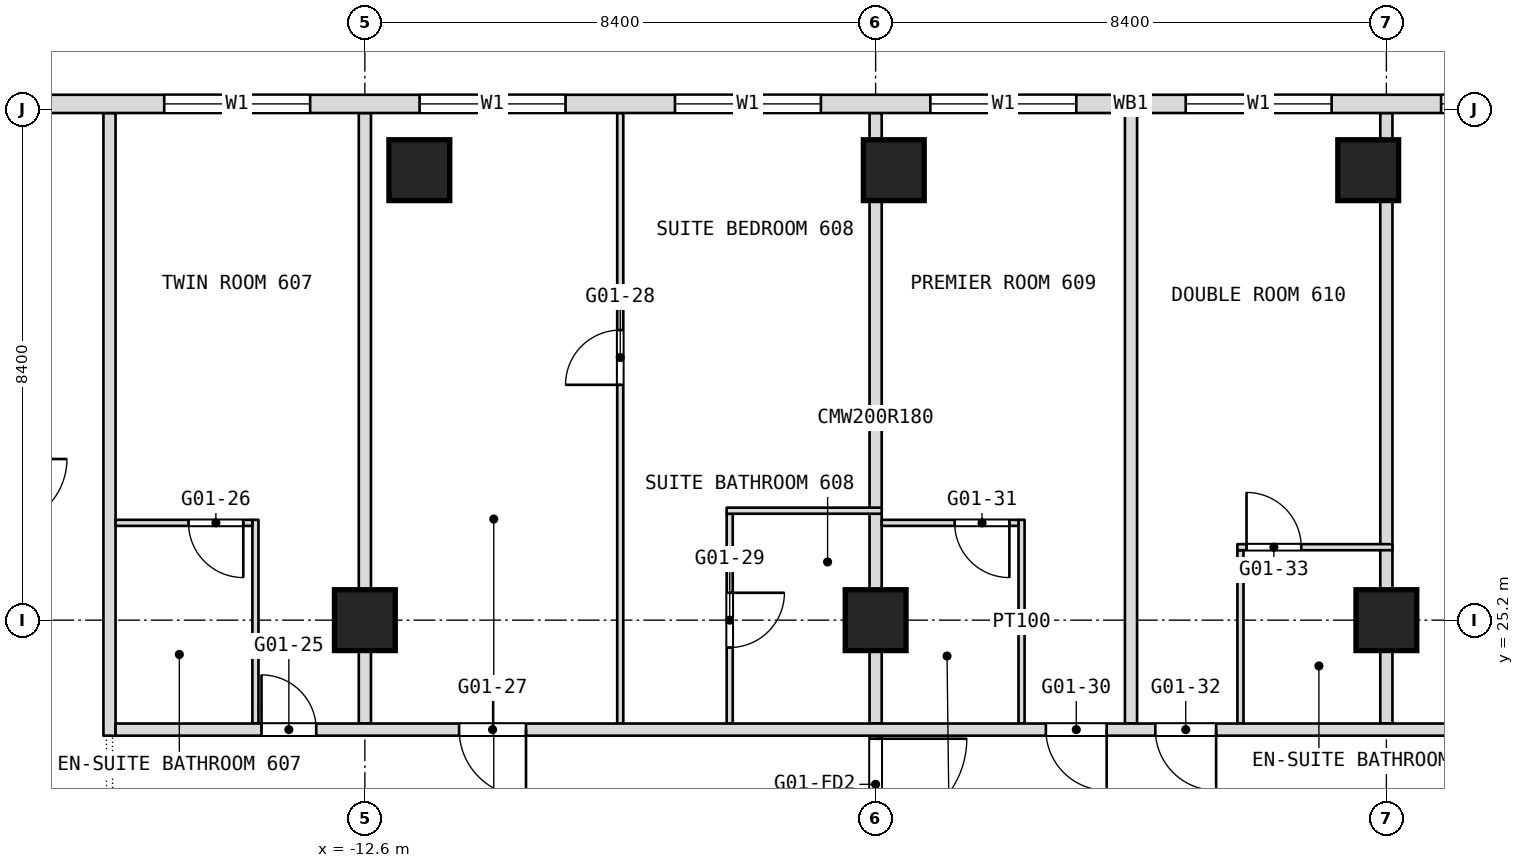
"""IFC4 building model, lengths in metres.
Left out: names, types, materials, properties, quantities, classifications, styles, units other than length and angle.
Written with IfcOpenShell. Run it as: python <this file> out.ifc"""

import sys

from ifc_helpers import new_model, si_unit, direction, frame, frame_2d, origin, origin_2d, place, context, subcontext, project, spatial, rectangle, extrude, element, fill, save


model = new_model("IFC4")
c1 = context("Model", 3, precision=1e-05, world=origin(), true_north=direction((0.0, 1.0)))
c2 = subcontext(c1, "Body", "Model", "MODEL_VIEW")
j1 = project(units=[si_unit("LENGTHUNIT", "METRE"), si_unit("PLANEANGLEUNIT", "RADIAN")], contexts=[c1])
p1 = place(None, origin())
s1 = spatial("IfcSite", under=j1, at=p1, CompositionType="ELEMENT")
p2 = place(p1, origin())
s2 = spatial("IfcBuilding", under=s1, at=p2, CompositionType="ELEMENT")
p3 = place(p2, frame((0.0, 0.0, 36.5)))
s3 = spatial("IfcBuildingStorey", under=s2, at=p3, CompositionType="ELEMENT", Elevation=36.5)
for number, where, z_axis, x_axis in (
    (1, (-12.6, 25.2, 0.0), (0.0, 0.0, 1.0), (1.0, 0.0, 0.0)),
    (2, (-4.2, 25.2, 0.0), (0.0, 0.0, 1.0), (1.0, 0.0, 0.0)),
    (3, (4.2, 25.2, 0.0), (0.0, 0.0, 1.0), (1.0, 0.0, 0.0)),
    (4, (-11.704, 32.6, 0.0), (0.0, 0.0, 1.0), (1.0, 0.0, 0.0)),
    (5, (-3.901, 32.6, 0.0), (0.0, 0.0, 1.0), (1.0, 0.0, 0.0)),
    (6, (3.901, 32.6, 0.0), (0.0, 0.0, 1.0), (1.0, 0.0, 0.0)),
):
    element("IfcColumn", number, at=place(p3, frame(where, z_axis=z_axis, x_axis=x_axis)), inside=s3, PredefinedType="COLUMN", context=c2, shape_type="SweptSolid", body=[
        extrude(rectangle(XDim=1.0, YDim=1.0, at=origin_2d()), origin(), (0.0, 0.0, 1.0), 3.6),
    ])
p4 = place(p3, frame((4.2, 23.5, 0.0), z_axis=(0.0, 0.0, 1.0), x_axis=(0.0, 1.0, 0.0)))
e7 = element("IfcWall", 7, at=p4, inside=s3, PredefinedType="PARTITIONING", context=c2, shape_type="SweptSolid", body=[
    extrude(rectangle(XDim=10.04, YDim=0.2, at=frame_2d((5.02, 0.0))), origin(), (0.0, 0.0, 1.0), 3.34),
])
p5 = place(p3, frame((1.8, 23.5, 0.0), z_axis=(0.0, 0.0, 1.0), x_axis=(0.0, 1.0, 0.0)))
e8 = element("IfcWall", 8, at=p5, inside=s3, PredefinedType="PARTITIONING", context=c2, shape_type="SweptSolid", body=[
    extrude(rectangle(XDim=2.85, YDim=0.1, at=frame_2d((1.425, 0.0))), origin(), (0.0, 0.0, 1.0), 3.34),
])
p6 = place(p3, frame((0.0, 23.5, 0.0), z_axis=(0.0, 0.0, 1.0), x_axis=(0.0, 1.0, 0.0)))
e9 = element("IfcWall", 9, at=p6, inside=s3, PredefinedType="PARTITIONING", context=c2, shape_type="SweptSolid", body=[
    extrude(rectangle(XDim=10.04, YDim=0.2, at=frame_2d((5.02, 0.0))), origin(), (0.0, 0.0, 1.0), 3.34),
])
p7 = place(p3, frame((-1.8, 23.5, 0.0), z_axis=(0.0, 0.0, 1.0), x_axis=(0.0, 1.0, 0.0)))
e10 = element("IfcWall", 10, at=p7, inside=s3, PredefinedType="PARTITIONING", context=c2, shape_type="SweptSolid", body=[
    extrude(rectangle(XDim=3.35, YDim=0.1, at=frame_2d((1.675, 0.0))), origin(), (0.0, 0.0, 1.0), 3.34),
])
p8 = place(p3, frame((-4.2, 16.8, 0.0), z_axis=(0.0, 0.0, 1.0), x_axis=(0.0, 1.0, 0.0)))
e11 = element("IfcWall", 11, at=p8, inside=s3, PredefinedType="PARTITIONING", context=c2, shape_type="SweptSolid", body=[
    extrude(rectangle(XDim=6.7, YDim=0.2, at=frame_2d((3.35, 0.0))), origin(), (0.0, 0.0, 1.0), 3.34),
])
p9 = place(p8, frame((0.15, 0.0, 0.0)))
e12 = element("IfcOpeningElement", 12, at=p9, cuts=e11, PredefinedType="OPENING", context=c2, shape_type="SweptSolid", body=[
    extrude(rectangle(XDim=1.5, YDim=2.1, at=frame_2d((0.75, 1.05))), frame((0.0, 0.1, 0.0), z_axis=(0.0, -1.0, 0.0), x_axis=(1.0, 0.0, 0.0)), (0.0, 0.0, 1.0), 0.2),
])
p10 = place(p8, frame((4.95, 0.0, 0.0)))
e13 = element("IfcOpeningElement", 13, at=p10, cuts=e11, PredefinedType="OPENING", context=c2, shape_type="SweptSolid", body=[
    extrude(rectangle(XDim=1.5, YDim=2.1, at=frame_2d((0.75, 1.05))), frame((0.0, 0.1, 0.0), z_axis=(0.0, -1.0, 0.0), x_axis=(1.0, 0.0, 0.0)), (0.0, 0.0, 1.0), 0.2),
])
p11 = place(p3, frame((-4.2, 23.5, 0.0), z_axis=(0.0, 0.0, 1.0), x_axis=(0.0, 1.0, 0.0)))
e14 = element("IfcWall", 14, at=p11, inside=s3, PredefinedType="PARTITIONING", context=c2, shape_type="SweptSolid", body=[
    extrude(rectangle(XDim=10.04, YDim=0.2, at=frame_2d((5.02, 0.0))), origin(), (0.0, 0.0, 1.0), 3.34),
])
p12 = place(p3, frame((-6.6, 23.5, 0.0), z_axis=(0.0, 0.0, 1.0), x_axis=(0.0, 1.0, 0.0)))
e15 = element("IfcWall", 15, at=p12, inside=s3, PredefinedType="PARTITIONING", context=c2, shape_type="SweptSolid", body=[
    extrude(rectangle(XDim=3.45, YDim=0.1, at=frame_2d((1.725, 0.0))), origin(), (0.0, 0.0, 1.0), 3.34),
])
p13 = place(p12, frame((1.25, 0.0, 0.0)))
e16 = element("IfcOpeningElement", 16, at=p13, cuts=e15, PredefinedType="OPENING", context=c2, shape_type="SweptSolid", body=[
    extrude(rectangle(XDim=0.9, YDim=2.1, at=frame_2d((0.45, 1.05))), frame((0.0, 0.05, 0.0), z_axis=(0.0, -1.0, 0.0), x_axis=(1.0, 0.0, 0.0)), (0.0, 0.0, 1.0), 0.1),
])
p14 = place(p3, frame((-8.4, 23.5, 0.0), z_axis=(0.0, 0.0, 1.0), x_axis=(0.0, 1.0, 0.0)))
e17 = element("IfcWall", 17, at=p14, inside=s3, PredefinedType="PARTITIONING", context=c2, shape_type="SweptSolid", body=[
    extrude(rectangle(XDim=10.04, YDim=0.1, at=frame_2d((5.02, 0.0))), origin(), (0.0, 0.0, 1.0), 3.34),
])
p15 = place(p14, frame((5.57, 0.0, 0.0)))
e18 = element("IfcOpeningElement", 18, at=p15, cuts=e17, PredefinedType="OPENING", context=c2, shape_type="SweptSolid", body=[
    extrude(rectangle(XDim=0.9, YDim=2.1, at=frame_2d((0.45, 1.05))), frame((0.0, 0.05, 0.0), z_axis=(0.0, -1.0, 0.0), x_axis=(1.0, 0.0, 0.0)), (0.0, 0.0, 1.0), 0.1),
])
p16 = place(p3, frame((-12.6, 23.5, 0.0), z_axis=(0.0, 0.0, 1.0), x_axis=(0.0, 1.0, 0.0)))
e19 = element("IfcWall", 19, at=p16, inside=s3, PredefinedType="PARTITIONING", context=c2, shape_type="SweptSolid", body=[
    extrude(rectangle(XDim=10.04, YDim=0.2, at=frame_2d((5.02, 0.0))), origin(), (0.0, 0.0, 1.0), 3.34),
])
p17 = place(p3, frame((-14.4, 23.5, 0.0), z_axis=(0.0, 0.0, 1.0), x_axis=(0.0, 1.0, 0.0)))
e20 = element("IfcWall", 20, at=p17, inside=s3, PredefinedType="PARTITIONING", context=c2, shape_type="SweptSolid", body=[
    extrude(rectangle(XDim=3.35, YDim=0.1, at=frame_2d((1.675, 0.0))), origin(), (0.0, 0.0, 1.0), 3.34),
])
p18 = place(p3, frame((-16.8, 23.3, 0.0), z_axis=(0.0, 0.0, 1.0), x_axis=(0.0, 1.0, 0.0)))
e21 = element("IfcWall", 21, at=p18, inside=s3, PredefinedType="PARTITIONING", context=c2, shape_type="SweptSolid", body=[
    extrude(rectangle(XDim=10.24, YDim=0.2, at=frame_2d((5.12, 0.0))), origin(), (0.0, 0.0, 1.0), 3.34),
])
p19 = place(p3, frame((-16.7, 23.4, 0.0), z_axis=(0.0, 0.0, 1.0), x_axis=(1.0, 0.0, 0.0)))
e22 = element("IfcWall", 22, at=p19, inside=s3, PredefinedType="PARTITIONING", context=c2, shape_type="SweptSolid", body=[
    extrude(rectangle(XDim=23.4, YDim=0.2, at=frame_2d((11.7, 0.0))), origin(), (0.0, 0.0, 1.0), 3.34),
])
p20 = place(p19, frame((2.4, 0.0, 0.0)))
e23 = element("IfcOpeningElement", 23, at=p20, cuts=e22, PredefinedType="OPENING", context=c2, shape_type="SweptSolid", body=[
    extrude(rectangle(XDim=0.9, YDim=2.1, at=frame_2d((0.45, 1.05))), frame((0.0, 0.1, 0.0), z_axis=(0.0, -1.0, 0.0), x_axis=(1.0, 0.0, 0.0)), (0.0, 0.0, 1.0), 0.2),
])
p21 = place(p19, frame((5.65, 0.0, 0.0)))
e24 = element("IfcOpeningElement", 24, at=p21, cuts=e22, PredefinedType="OPENING", context=c2, shape_type="SweptSolid", body=[
    extrude(rectangle(XDim=1.1, YDim=2.1, at=frame_2d((0.55, 1.05))), frame((0.0, 0.1, 0.0), z_axis=(0.0, -1.0, 0.0), x_axis=(1.0, 0.0, 0.0)), (0.0, 0.0, 1.0), 0.2),
])
p22 = place(p19, frame((15.3, 0.0, 0.0)))
e25 = element("IfcOpeningElement", 25, at=p22, cuts=e22, PredefinedType="OPENING", context=c2, shape_type="SweptSolid", body=[
    extrude(rectangle(XDim=1.0, YDim=2.1, at=frame_2d((0.5, 1.05))), frame((0.0, 0.1, 0.0), z_axis=(0.0, -1.0, 0.0), x_axis=(1.0, 0.0, 0.0)), (0.0, 0.0, 1.0), 0.2),
])
p23 = place(p19, frame((17.1, 0.0, 0.0)))
e26 = element("IfcOpeningElement", 26, at=p23, cuts=e22, PredefinedType="OPENING", context=c2, shape_type="SweptSolid", body=[
    extrude(rectangle(XDim=1.0, YDim=2.1, at=frame_2d((0.5, 1.05))), frame((0.0, 0.1, 0.0), z_axis=(0.0, -1.0, 0.0), x_axis=(1.0, 0.0, 0.0)), (0.0, 0.0, 1.0), 0.2),
])
p24 = place(p3, frame((1.75, 26.4, 0.0), z_axis=(0.0, 0.0, 1.0), x_axis=(1.0, 0.0, 0.0)))
e27 = element("IfcWall", 27, at=p24, inside=s3, PredefinedType="PARTITIONING", context=c2, shape_type="SweptSolid", body=[
    extrude(rectangle(XDim=2.55, YDim=0.1, at=frame_2d((1.275, 0.0))), origin(), (0.0, 0.0, 1.0), 3.34),
])
p25 = place(p24, frame((0.15, 0.0, 0.0)))
e28 = element("IfcOpeningElement", 28, at=p25, cuts=e27, PredefinedType="OPENING", context=c2, shape_type="SweptSolid", body=[
    extrude(rectangle(XDim=0.9, YDim=2.1, at=frame_2d((0.45, 1.05))), frame((0.0, 0.05, 0.0), z_axis=(0.0, -1.0, 0.0), x_axis=(1.0, 0.0, 0.0)), (0.0, 0.0, 1.0), 0.1),
])
p26 = place(p3, frame((-16.7, 26.8, 0.0), z_axis=(0.0, 0.0, 1.0), x_axis=(1.0, 0.0, 0.0)))
e29 = element("IfcWall", 29, at=p26, inside=s3, PredefinedType="PARTITIONING", context=c2, shape_type="SweptSolid", body=[
    extrude(rectangle(XDim=2.25, YDim=0.1, at=frame_2d((1.125, 0.0))), origin(), (0.0, 0.0, 1.0), 3.34),
])
p27 = place(p26, frame((1.2, 0.0, 0.0)))
e30 = element("IfcOpeningElement", 30, at=p27, cuts=e29, PredefinedType="OPENING", context=c2, shape_type="SweptSolid", body=[
    extrude(rectangle(XDim=0.9, YDim=2.1, at=frame_2d((0.45, 1.05))), frame((0.0, 0.05, 0.0), z_axis=(0.0, -1.0, 0.0), x_axis=(1.0, 0.0, 0.0)), (0.0, 0.0, 1.0), 0.1),
])
p28 = place(p3, frame((-4.1, 26.8, 0.0), z_axis=(0.0, 0.0, 1.0), x_axis=(1.0, 0.0, 0.0)))
e31 = element("IfcWall", 31, at=p28, inside=s3, PredefinedType="PARTITIONING", context=c2, shape_type="SweptSolid", body=[
    extrude(rectangle(XDim=2.25, YDim=0.1, at=frame_2d((1.125, 0.0))), origin(), (0.0, 0.0, 1.0), 3.34),
])
p29 = place(p28, frame((1.2, 0.0, 0.0)))
e32 = element("IfcOpeningElement", 32, at=p29, cuts=e31, PredefinedType="OPENING", context=c2, shape_type="SweptSolid", body=[
    extrude(rectangle(XDim=0.9, YDim=2.1, at=frame_2d((0.45, 1.05))), frame((0.0, 0.05, 0.0), z_axis=(0.0, -1.0, 0.0), x_axis=(1.0, 0.0, 0.0)), (0.0, 0.0, 1.0), 0.1),
])
p30 = place(p3, frame((-6.65, 27.0, 0.0), z_axis=(0.0, 0.0, 1.0), x_axis=(1.0, 0.0, 0.0)))
e33 = element("IfcWall", 33, at=p30, inside=s3, PredefinedType="PARTITIONING", context=c2, shape_type="SweptSolid", body=[
    extrude(rectangle(XDim=2.55, YDim=0.1, at=frame_2d((1.275, 0.0))), origin(), (0.0, 0.0, 1.0), 3.34),
])
p31 = place(p3, frame((23.406, 33.69, 0.0), z_axis=(0.0, 0.0, 1.0), x_axis=(-1.0, 0.0, 0.0)))
e34 = element("IfcWall", 34, at=p31, inside=s3, PredefinedType="NOTDEFINED", context=c2, shape_type="SweptSolid", body=[
    extrude(rectangle(XDim=46.812, YDim=0.3, at=frame_2d((23.406, 0.0))), origin(), (0.0, 0.0, 1.0), 3.6),
])
p32 = place(p31, frame((2.186, 0.0, 0.9)))
e35 = element("IfcOpeningElement", 35, at=p32, cuts=e34, PredefinedType="OPENING", context=c2, shape_type="SweptSolid", body=[
    extrude(rectangle(XDim=2.4, YDim=2.1, at=frame_2d((1.2, 1.05))), frame((0.0, 0.15, 0.0), z_axis=(0.0, -1.0, 0.0), x_axis=(1.0, 0.0, 0.0)), (0.0, 0.0, 1.0), 0.3),
])
p33 = place(p31, frame((7.506, 0.0, 0.9)))
e36 = element("IfcOpeningElement", 36, at=p33, cuts=e34, PredefinedType="OPENING", context=c2, shape_type="SweptSolid", body=[
    extrude(rectangle(XDim=2.4, YDim=2.1, at=frame_2d((1.2, 1.05))), frame((0.0, 0.15, 0.0), z_axis=(0.0, -1.0, 0.0), x_axis=(1.0, 0.0, 0.0)), (0.0, 0.0, 1.0), 0.3),
])
p34 = place(p31, frame((11.706, 0.0, 0.9)))
e37 = element("IfcOpeningElement", 37, at=p34, cuts=e34, PredefinedType="OPENING", context=c2, shape_type="SweptSolid", body=[
    extrude(rectangle(XDim=2.4, YDim=2.1, at=frame_2d((1.2, 1.05))), frame((0.0, 0.15, 0.0), z_axis=(0.0, -1.0, 0.0), x_axis=(1.0, 0.0, 0.0)), (0.0, 0.0, 1.0), 0.3),
])
p35 = place(p31, frame((15.906, 0.0, 0.9)))
e38 = element("IfcOpeningElement", 38, at=p35, cuts=e34, PredefinedType="OPENING", context=c2, shape_type="SweptSolid", body=[
    extrude(rectangle(XDim=2.4, YDim=2.1, at=frame_2d((1.2, 1.05))), frame((0.0, 0.15, 0.0), z_axis=(0.0, -1.0, 0.0), x_axis=(1.0, 0.0, 0.0)), (0.0, 0.0, 1.0), 0.3),
])
p36 = place(p31, frame((20.106, 0.0, 0.9)))
e39 = element("IfcOpeningElement", 39, at=p36, cuts=e34, PredefinedType="OPENING", context=c2, shape_type="SweptSolid", body=[
    extrude(rectangle(XDim=2.4, YDim=2.1, at=frame_2d((1.2, 1.05))), frame((0.0, 0.15, 0.0), z_axis=(0.0, -1.0, 0.0), x_axis=(1.0, 0.0, 0.0)), (0.0, 0.0, 1.0), 0.3),
])
p37 = place(p31, frame((24.306, 0.0, 0.9)))
e40 = element("IfcOpeningElement", 40, at=p37, cuts=e34, PredefinedType="OPENING", context=c2, shape_type="SweptSolid", body=[
    extrude(rectangle(XDim=2.4, YDim=2.1, at=frame_2d((1.2, 1.05))), frame((0.0, 0.15, 0.0), z_axis=(0.0, -1.0, 0.0), x_axis=(1.0, 0.0, 0.0)), (0.0, 0.0, 1.0), 0.3),
])
p38 = place(p31, frame((28.506, 0.0, 0.9)))
e41 = element("IfcOpeningElement", 41, at=p38, cuts=e34, PredefinedType="OPENING", context=c2, shape_type="SweptSolid", body=[
    extrude(rectangle(XDim=2.4, YDim=2.1, at=frame_2d((1.2, 1.05))), frame((0.0, 0.15, 0.0), z_axis=(0.0, -1.0, 0.0), x_axis=(1.0, 0.0, 0.0)), (0.0, 0.0, 1.0), 0.3),
])
p39 = place(p31, frame((32.706, 0.0, 0.9)))
e42 = element("IfcOpeningElement", 42, at=p39, cuts=e34, PredefinedType="OPENING", context=c2, shape_type="SweptSolid", body=[
    extrude(rectangle(XDim=2.4, YDim=2.1, at=frame_2d((1.2, 1.05))), frame((0.0, 0.15, 0.0), z_axis=(0.0, -1.0, 0.0), x_axis=(1.0, 0.0, 0.0)), (0.0, 0.0, 1.0), 0.3),
])
p40 = place(p31, frame((36.906, 0.0, 0.9)))
e43 = element("IfcOpeningElement", 43, at=p40, cuts=e34, PredefinedType="OPENING", context=c2, shape_type="SweptSolid", body=[
    extrude(rectangle(XDim=2.4, YDim=2.1, at=frame_2d((1.2, 1.05))), frame((0.0, 0.15, 0.0), z_axis=(0.0, -1.0, 0.0), x_axis=(1.0, 0.0, 0.0)), (0.0, 0.0, 1.0), 0.3),
])
p41 = place(p31, frame((42.226, 0.0, 0.9)))
e44 = element("IfcOpeningElement", 44, at=p41, cuts=e34, PredefinedType="OPENING", context=c2, shape_type="SweptSolid", body=[
    extrude(rectangle(XDim=2.4, YDim=2.1, at=frame_2d((1.2, 1.05))), frame((0.0, 0.15, 0.0), z_axis=(0.0, -1.0, 0.0), x_axis=(1.0, 0.0, 0.0)), (0.0, 0.0, 1.0), 0.3),
])
p42 = place(p13, origin())
e45 = element("IfcDoor", 45, at=p42, inside=s3, OperationType="SINGLE_SWING_RIGHT", PredefinedType="DOOR", context=c2, shape_type="SweptSolid", body=[
    extrude(rectangle(XDim=0.9, YDim=2.1, at=frame_2d((0.45, 1.05))), frame((0.0, 0.025, 0.0), z_axis=(0.0, -1.0, 0.0), x_axis=(1.0, 0.0, 0.0)), (0.0, 0.0, 1.0), 0.05),
])
fill(e16, e45)
p43 = place(p15, origin())
e46 = element("IfcDoor", 46, at=p43, inside=s3, OperationType="SINGLE_SWING_RIGHT", PredefinedType="DOOR", context=c2, shape_type="SweptSolid", body=[
    extrude(rectangle(XDim=0.9, YDim=2.1, at=frame_2d((0.45, 1.05))), frame((0.0, 0.025, 0.0), z_axis=(0.0, -1.0, 0.0), x_axis=(1.0, 0.0, 0.0)), (0.0, 0.0, 1.0), 0.05),
])
fill(e18, e46)
p44 = place(p20, origin())
e47 = element("IfcDoor", 47, at=p44, inside=s3, OperationType="SINGLE_SWING_LEFT", PredefinedType="DOOR", context=c2, shape_type="SweptSolid", body=[
    extrude(rectangle(XDim=0.9, YDim=2.1, at=frame_2d((0.45, 1.05))), frame((0.0, 0.025, 0.0), z_axis=(0.0, -1.0, 0.0), x_axis=(1.0, 0.0, 0.0)), (0.0, 0.0, 1.0), 0.05),
])
fill(e23, e47)
p45 = place(p21, origin())
e48 = element("IfcDoor", 48, at=p45, inside=s3, OperationType="SINGLE_SWING_RIGHT", PredefinedType="DOOR", context=c2, shape_type="SweptSolid", body=[
    extrude(rectangle(XDim=1.1, YDim=2.1, at=frame_2d((0.55, 1.05))), frame((0.0, 0.025, 0.0), z_axis=(0.0, -1.0, 0.0), x_axis=(1.0, 0.0, 0.0)), (0.0, 0.0, 1.0), 0.05),
])
fill(e24, e48)
p46 = place(p22, origin())
e49 = element("IfcDoor", 49, at=p46, inside=s3, OperationType="SINGLE_SWING_LEFT", PredefinedType="DOOR", context=c2, shape_type="SweptSolid", body=[
    extrude(rectangle(XDim=1.0, YDim=2.1, at=frame_2d((0.5, 1.05))), frame((0.0, 0.025, 0.0), z_axis=(0.0, -1.0, 0.0), x_axis=(1.0, 0.0, 0.0)), (0.0, 0.0, 1.0), 0.05),
])
fill(e25, e49)
p47 = place(p23, origin())
e50 = element("IfcDoor", 50, at=p47, inside=s3, OperationType="SINGLE_SWING_LEFT", PredefinedType="DOOR", context=c2, shape_type="SweptSolid", body=[
    extrude(rectangle(XDim=1.0, YDim=2.1, at=frame_2d((0.5, 1.05))), frame((0.0, 0.025, 0.0), z_axis=(0.0, -1.0, 0.0), x_axis=(1.0, 0.0, 0.0)), (0.0, 0.0, 1.0), 0.05),
])
fill(e26, e50)
p48 = place(p25, origin())
e51 = element("IfcDoor", 51, at=p48, inside=s3, OperationType="SINGLE_SWING_RIGHT", PredefinedType="DOOR", context=c2, shape_type="SweptSolid", body=[
    extrude(rectangle(XDim=0.9, YDim=2.1, at=frame_2d((0.45, 1.05))), frame((0.0, 0.025, 0.0), z_axis=(0.0, -1.0, 0.0), x_axis=(1.0, 0.0, 0.0)), (0.0, 0.0, 1.0), 0.05),
])
fill(e28, e51)
p49 = place(p27, origin())
e52 = element("IfcDoor", 52, at=p49, inside=s3, OperationType="SINGLE_SWING_LEFT", PredefinedType="DOOR", context=c2, shape_type="SweptSolid", body=[
    extrude(rectangle(XDim=0.9, YDim=2.1, at=frame_2d((0.45, 1.05))), frame((0.0, 0.025, 0.0), z_axis=(0.0, -1.0, 0.0), x_axis=(1.0, 0.0, 0.0)), (0.0, 0.0, 1.0), 0.05),
])
fill(e30, e52)
p50 = place(p29, origin())
e53 = element("IfcDoor", 53, at=p50, inside=s3, OperationType="SINGLE_SWING_LEFT", PredefinedType="DOOR", context=c2, shape_type="SweptSolid", body=[
    extrude(rectangle(XDim=0.9, YDim=2.1, at=frame_2d((0.45, 1.05))), frame((0.0, 0.025, 0.0), z_axis=(0.0, -1.0, 0.0), x_axis=(1.0, 0.0, 0.0)), (0.0, 0.0, 1.0), 0.05),
])
fill(e32, e53)
p51 = place(p35, origin())
e54 = element("IfcWindow", 54, at=p51, inside=s3, PartitioningType="SINGLE_PANEL", PredefinedType="WINDOW", context=c2, shape_type="SweptSolid", body=[
    extrude(rectangle(XDim=2.4, YDim=2.1, at=frame_2d((1.2, 1.05))), frame((0.0, 0.03, 0.0), z_axis=(0.0, -1.0, 0.0), x_axis=(1.0, 0.0, 0.0)), (0.0, 0.0, 1.0), 0.06),
])
fill(e38, e54)
p52 = place(p36, origin())
e55 = element("IfcWindow", 55, at=p52, inside=s3, PartitioningType="SINGLE_PANEL", PredefinedType="WINDOW", context=c2, shape_type="SweptSolid", body=[
    extrude(rectangle(XDim=2.4, YDim=2.1, at=frame_2d((1.2, 1.05))), frame((0.0, 0.03, 0.0), z_axis=(0.0, -1.0, 0.0), x_axis=(1.0, 0.0, 0.0)), (0.0, 0.0, 1.0), 0.06),
])
fill(e39, e55)
p53 = place(p37, origin())
e56 = element("IfcWindow", 56, at=p53, inside=s3, PartitioningType="SINGLE_PANEL", PredefinedType="WINDOW", context=c2, shape_type="SweptSolid", body=[
    extrude(rectangle(XDim=2.4, YDim=2.1, at=frame_2d((1.2, 1.05))), frame((0.0, 0.03, 0.0), z_axis=(0.0, -1.0, 0.0), x_axis=(1.0, 0.0, 0.0)), (0.0, 0.0, 1.0), 0.06),
])
fill(e40, e56)
p54 = place(p38, origin())
e57 = element("IfcWindow", 57, at=p54, inside=s3, PartitioningType="SINGLE_PANEL", PredefinedType="WINDOW", context=c2, shape_type="SweptSolid", body=[
    extrude(rectangle(XDim=2.4, YDim=2.1, at=frame_2d((1.2, 1.05))), frame((0.0, 0.03, 0.0), z_axis=(0.0, -1.0, 0.0), x_axis=(1.0, 0.0, 0.0)), (0.0, 0.0, 1.0), 0.06),
])
fill(e41, e57)
p55 = place(p39, origin())
e58 = element("IfcWindow", 58, at=p55, inside=s3, PartitioningType="SINGLE_PANEL", PredefinedType="WINDOW", context=c2, shape_type="SweptSolid", body=[
    extrude(rectangle(XDim=2.4, YDim=2.1, at=frame_2d((1.2, 1.05))), frame((0.0, 0.03, 0.0), z_axis=(0.0, -1.0, 0.0), x_axis=(1.0, 0.0, 0.0)), (0.0, 0.0, 1.0), 0.06),
])
fill(e42, e58)
p56 = place(p40, origin())
e59 = element("IfcWindow", 59, at=p56, inside=s3, PartitioningType="SINGLE_PANEL", PredefinedType="WINDOW", context=c2, shape_type="SweptSolid", body=[
    extrude(rectangle(XDim=2.4, YDim=2.1, at=frame_2d((1.2, 1.05))), frame((0.0, 0.03, 0.0), z_axis=(0.0, -1.0, 0.0), x_axis=(1.0, 0.0, 0.0)), (0.0, 0.0, 1.0), 0.06),
])
fill(e43, e59)
p57 = place(p10, origin())
e60 = element("IfcDoor", 60, at=p57, inside=s3, OperationType="DOUBLE_DOOR_DOUBLE_SWING", PredefinedType="DOOR", context=c2, shape_type="SweptSolid", body=[
    extrude(rectangle(XDim=1.5, YDim=2.1, at=frame_2d((0.75, 1.05))), frame((0.0, 0.025, 0.0), z_axis=(0.0, -1.0, 0.0), x_axis=(1.0, 0.0, 0.0)), (0.0, 0.0, 1.0), 0.05),
])
fill(e13, e60)
save(model, sys.argv[1])
